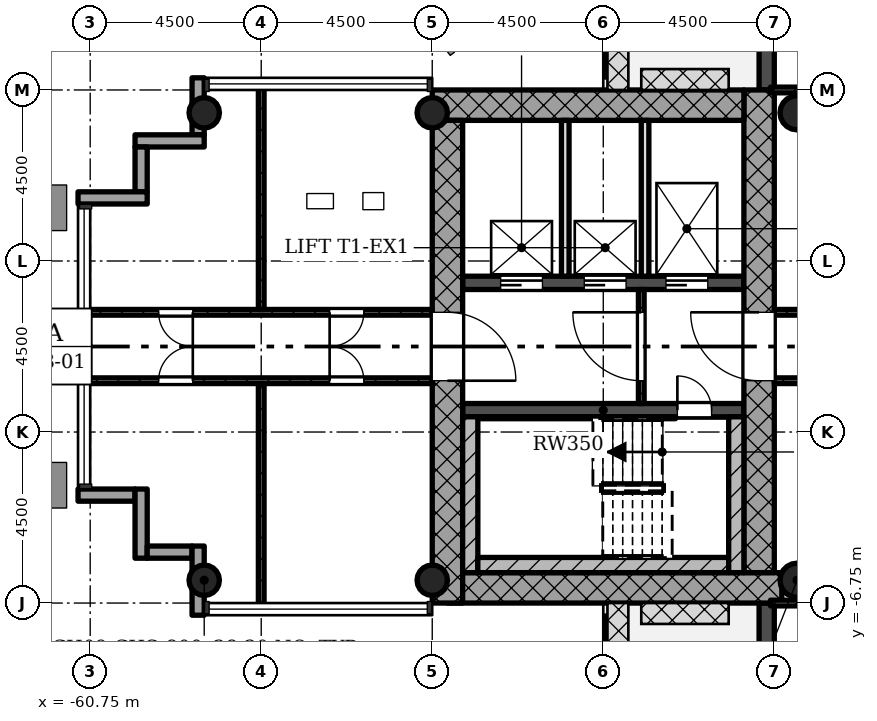
"""IFC4 building model, lengths in metres.
Left out: names, types, materials, properties, quantities, classifications, styles, units other than length and angle.
Written with IfcOpenShell. Run it as: python <this file> out.ifc"""

import sys

from ifc_helpers import new_model, si_unit, direction, frame, frame_2d, origin, origin_2d, place, context, subcontext, project, spatial, rectangle, hollow_circle, extrude, element, fill, save


model = new_model("IFC4")
c1 = context("Model", 3, precision=1e-05, world=origin(), true_north=direction((0.0, 1.0)))
c2 = subcontext(c1, "Body", "Model", "MODEL_VIEW")
j1 = project(units=[si_unit("LENGTHUNIT", "METRE"), si_unit("PLANEANGLEUNIT", "RADIAN")], contexts=[c1])
p1 = place(None, origin())
s1 = spatial("IfcSite", under=j1, at=p1, CompositionType="ELEMENT")
p2 = place(p1, origin())
s2 = spatial("IfcBuilding", under=s1, at=p2, CompositionType="ELEMENT")
p3 = place(p2, frame((0.0, 0.0, 128.7)))
s3 = spatial("IfcBuildingStorey", under=s2, at=p3, CompositionType="ELEMENT", Elevation=128.7)
p4 = place(p3, frame((-51.348, -6.35, 0.0), z_axis=(0.0, 0.0, 1.0), x_axis=(1.0, 0.0, 0.0)))
e1 = element("IfcWall", 1, at=p4, inside=s3, PredefinedType="SHEAR", context=c2, shape_type="SweptSolid", body=[
    extrude(rectangle(XDim=8.796, YDim=0.8, at=frame_2d((4.398, 0.0))), origin(), (0.0, 0.0, 1.0), 5.0),
])
p5 = place(p3, frame((-43.15, -5.95, 0.0), z_axis=(0.0, 0.0, 1.0), x_axis=(0.0, 1.0, 0.0)))
e2 = element("IfcWall", 2, at=p5, inside=s3, PredefinedType="SHEAR", context=c2, shape_type="SweptSolid", body=[
    extrude(rectangle(XDim=12.7, YDim=0.8, at=frame_2d((6.35, 0.0))), origin(), (0.0, 0.0, 1.0), 5.0),
])
p6 = place(p5, frame((5.05, 0.0, 0.0)))
e3 = element("IfcOpeningElement", 3, at=p6, cuts=e2, PredefinedType="OPENING", context=c2, shape_type="SweptSolid", body=[
    extrude(rectangle(XDim=1.8, YDim=2.1, at=frame_2d((0.9, 1.05))), frame((0.0, 0.41, 0.0), z_axis=(0.0, -1.0, 0.0), x_axis=(1.0, 0.0, 0.0)), (0.0, 0.0, 1.0), 0.82),
])
p7 = place(p3, frame((-43.55, 6.35, 0.0), z_axis=(0.0, 0.0, 1.0), x_axis=(-1.0, 0.0, 0.0)))
e4 = element("IfcWall", 4, at=p7, inside=s3, PredefinedType="SHEAR", context=c2, shape_type="SweptSolid", body=[
    extrude(rectangle(XDim=8.2, YDim=0.8, at=frame_2d((4.1, 0.0))), origin(), (0.0, 0.0, 1.0), 5.0),
])
p8 = place(p3, frame((-51.35, 5.95, 0.0), z_axis=(0.0, 0.0, 1.0), x_axis=(0.0, -1.0, 0.0)))
e5 = element("IfcWall", 5, at=p8, inside=s3, PredefinedType="SHEAR", context=c2, shape_type="SweptSolid", body=[
    extrude(rectangle(XDim=12.7, YDim=0.8, at=frame_2d((6.35, 0.0))), origin(), (0.0, 0.0, 1.0), 5.0),
])
p9 = place(p8, frame((5.05, 0.0, 0.0)))
e6 = element("IfcOpeningElement", 6, at=p9, cuts=e5, PredefinedType="OPENING", context=c2, shape_type="SweptSolid", body=[
    extrude(rectangle(XDim=1.8, YDim=2.1, at=frame_2d((0.9, 1.05))), frame((0.0, 0.41, 0.0), z_axis=(0.0, -1.0, 0.0), x_axis=(1.0, 0.0, 0.0)), (0.0, 0.0, 1.0), 0.82),
])
p10 = place(p3, frame((-50.95, -1.675, 0.0), z_axis=(0.0, 0.0, 1.0), x_axis=(1.0, 0.0, 0.0)))
e7 = element("IfcWall", 7, at=p10, inside=s3, PredefinedType="SHEAR", context=c2, shape_type="SweptSolid", body=[
    extrude(rectangle(XDim=7.4, YDim=0.35, at=frame_2d((3.7, 0.0))), origin(), (0.0, 0.0, 1.0), 5.0),
])
p11 = place(p10, frame((5.65, 0.0, 0.0)))
e8 = element("IfcOpeningElement", 8, at=p11, cuts=e7, PredefinedType="OPENING", context=c2, shape_type="SweptSolid", body=[
    extrude(rectangle(XDim=0.9, YDim=2.1, at=frame_2d((0.45, 1.05))), frame((0.0, 0.185, 0.0), z_axis=(0.0, -1.0, 0.0), x_axis=(1.0, 0.0, 0.0)), (0.0, 0.0, 1.0), 0.37),
])
p12 = place(p3, frame((-50.95, 1.675, 0.0), z_axis=(0.0, 0.0, 1.0), x_axis=(1.0, 0.0, 0.0)))
e9 = element("IfcWall", 9, at=p12, inside=s3, PredefinedType="SHEAR", context=c2, shape_type="SweptSolid", body=[
    extrude(rectangle(XDim=7.4, YDim=0.35, at=frame_2d((3.7, 0.0))), origin(), (0.0, 0.0, 1.0), 5.0),
])
p13 = place(p12, frame((5.35, 0.0, 0.0)))
e10 = element("IfcOpeningElement", 10, at=p13, cuts=e9, PredefinedType="OPENING", context=c2, shape_type="SweptSolid", body=[
    extrude(rectangle(XDim=1.1, YDim=2.1, at=frame_2d((0.55, 1.05))), frame((0.0, 0.185, 0.0), z_axis=(0.0, -1.0, 0.0), x_axis=(1.0, 0.0, 0.0)), (0.0, 0.0, 1.0), 0.37),
])
p14 = place(p12, frame((3.2, 0.0, 0.0)))
e11 = element("IfcOpeningElement", 11, at=p14, cuts=e9, PredefinedType="OPENING", context=c2, shape_type="SweptSolid", body=[
    extrude(rectangle(XDim=1.1, YDim=2.1, at=frame_2d((0.55, 1.05))), frame((0.0, 0.185, 0.0), z_axis=(0.0, -1.0, 0.0), x_axis=(1.0, 0.0, 0.0)), (0.0, 0.0, 1.0), 0.37),
])
p15 = place(p12, frame((1.0, 0.0, 0.0)))
e12 = element("IfcOpeningElement", 12, at=p15, cuts=e9, PredefinedType="OPENING", context=c2, shape_type="SweptSolid", body=[
    extrude(rectangle(XDim=1.1, YDim=2.1, at=frame_2d((0.55, 1.05))), frame((0.0, 0.185, 0.0), z_axis=(0.0, -1.0, 0.0), x_axis=(1.0, 0.0, 0.0)), (0.0, 0.0, 1.0), 0.37),
])
for number, where, z_axis, x_axis in (
    (13, (-51.75, -6.15, 0.0), (0.0, 0.0, 1.0), (1.0, 0.0, 0.0)),
    (14, (-51.75, 6.15, 0.0), (0.0, 0.0, 1.0), (1.0, 0.0, 0.0)),
    (15, (-57.75, -6.15, 0.0), (0.0, 0.0, 1.0), (1.0, 0.0, 0.0)),
    (16, (-57.75, 6.15, 0.0), (0.0, 0.0, 1.0), (1.0, 0.0, 0.0)),
):
    element("IfcColumn", number, at=place(p3, frame(where, z_axis=z_axis, x_axis=x_axis)), inside=s3, PredefinedType="COLUMN", context=c2, shape_type="SweptSolid", body=[
        extrude(hollow_circle(Radius=0.4, WallThickness=0.028, at=origin_2d()), origin(), (0.0, 0.0, 1.0), 5.0),
    ])
for number, where, z_axis, x_axis in (
    (17, (-42.15, -6.15, 0.0), (0.0, 0.0, 1.0), (1.0, 0.0, 0.0)),
    (18, (-42.15, 6.15, 0.0), (0.0, 0.0, 1.0), (1.0, 0.0, 0.0)),
):
    element("IfcColumn", number, at=place(p3, frame(where, z_axis=z_axis, x_axis=x_axis)), inside=s3, PredefinedType="COLUMN", context=c2, shape_type="SweptSolid", body=[
        extrude(hollow_circle(Radius=0.45, WallThickness=0.032, at=origin_2d()), origin(), (0.0, 0.0, 1.0), 5.0),
    ])
p16 = place(p3, frame((-61.07, -3.91, -0.3), z_axis=(0.0, 0.0, 1.0), x_axis=(1.0, 0.0, 0.0)))
e19 = element("IfcWall", 19, at=p16, inside=s3, PredefinedType="STANDARD", context=c2, shape_type="SweptSolid", body=[
    extrude(rectangle(XDim=1.5, YDim=0.32, at=frame_2d((0.75, 0.0))), origin(), (0.0, 0.0, 1.0), 5.0),
])
p17 = place(p3, frame((-59.41, -3.75, -0.3), z_axis=(0.0, 0.0, 1.0), x_axis=(0.0, -1.0, 0.0)))
e20 = element("IfcWall", 20, at=p17, inside=s3, PredefinedType="STANDARD", context=c2, shape_type="SweptSolid", body=[
    extrude(rectangle(XDim=1.82, YDim=0.32, at=frame_2d((0.91, 0.0))), origin(), (0.0, 0.0, 1.0), 5.0),
])
p18 = place(p3, frame((-59.25, -5.41, -0.3), z_axis=(0.0, 0.0, 1.0), x_axis=(1.0, 0.0, 0.0)))
e21 = element("IfcWall", 21, at=p18, inside=s3, PredefinedType="STANDARD", context=c2, shape_type="SweptSolid", body=[
    extrude(rectangle(XDim=1.18, YDim=0.32, at=frame_2d((0.59, 0.0))), origin(), (0.0, 0.0, 1.0), 5.0),
])
p19 = place(p3, frame((-57.91, -5.25, -0.3), z_axis=(0.0, 0.0, 1.0), x_axis=(0.0, -1.0, 0.0)))
e22 = element("IfcWall", 22, at=p19, inside=s3, PredefinedType="STANDARD", context=c2, shape_type="SweptSolid", body=[
    extrude(rectangle(XDim=1.82, YDim=0.32, at=frame_2d((0.91, 0.0))), origin(), (0.0, 0.0, 1.0), 5.0),
])
p20 = place(p3, frame((-42.95, -6.75, -0.02), z_axis=(0.0, 0.0, 1.0), x_axis=(0.0, -1.0, 0.0)))
e23 = element("IfcWall", 23, at=p20, inside=s3, PredefinedType="STANDARD", context=c2, shape_type="SweptSolid", body=[
    extrude(rectangle(XDim=4.5, YDim=0.4, at=frame_2d((2.25, 0.0))), origin(), (0.0, 0.0, 1.0), 4.72),
])
p21 = place(p20, frame((1.35, 0.0, 0.02)))
e24 = element("IfcOpeningElement", 24, at=p21, cuts=e23, PredefinedType="OPENING", context=c2, shape_type="SweptSolid", body=[
    extrude(rectangle(XDim=1.8, YDim=2.1, at=frame_2d((0.9, 1.05))), frame((0.0, 0.21, 0.0), z_axis=(0.0, -1.0, 0.0), x_axis=(1.0, 0.0, 0.0)), (0.0, 0.0, 1.0), 0.42),
])
p22 = place(p3, frame((-42.95, 11.25, -0.02), z_axis=(0.0, 0.0, 1.0), x_axis=(0.0, -1.0, 0.0)))
e25 = element("IfcWall", 25, at=p22, inside=s3, PredefinedType="STANDARD", context=c2, shape_type="SweptSolid", body=[
    extrude(rectangle(XDim=4.5, YDim=0.4, at=frame_2d((2.25, 0.0))), origin(), (0.0, 0.0, 1.0), 4.72),
])
p23 = place(p22, frame((1.35, 0.0, 0.02)))
e26 = element("IfcOpeningElement", 26, at=p23, cuts=e25, PredefinedType="OPENING", context=c2, shape_type="SweptSolid", body=[
    extrude(rectangle(XDim=1.8, YDim=2.1, at=frame_2d((0.9, 1.05))), frame((0.0, 0.21, 0.0), z_axis=(0.0, -1.0, 0.0), x_axis=(1.0, 0.0, 0.0)), (0.0, 0.0, 1.0), 0.42),
])
p24 = place(p3, frame((-57.91, 7.07, -0.3), z_axis=(0.0, 0.0, 1.0), x_axis=(0.0, -1.0, 0.0)))
e27 = element("IfcWall", 27, at=p24, inside=s3, PredefinedType="STANDARD", context=c2, shape_type="SweptSolid", body=[
    extrude(rectangle(XDim=1.5, YDim=0.32, at=frame_2d((0.75, 0.0))), origin(), (0.0, 0.0, 1.0), 5.0),
])
p25 = place(p3, frame((-57.75, 5.41, -0.3), z_axis=(0.0, 0.0, 1.0), x_axis=(-1.0, 0.0, 0.0)))
e28 = element("IfcWall", 28, at=p25, inside=s3, PredefinedType="STANDARD", context=c2, shape_type="SweptSolid", body=[
    extrude(rectangle(XDim=1.82, YDim=0.32, at=frame_2d((0.91, 0.0))), origin(), (0.0, 0.0, 1.0), 5.0),
])
p26 = place(p3, frame((-59.41, 5.25, -0.3), z_axis=(0.0, 0.0, 1.0), x_axis=(0.0, -1.0, 0.0)))
e29 = element("IfcWall", 29, at=p26, inside=s3, PredefinedType="STANDARD", context=c2, shape_type="SweptSolid", body=[
    extrude(rectangle(XDim=1.18, YDim=0.32, at=frame_2d((0.59, 0.0))), origin(), (0.0, 0.0, 1.0), 5.0),
])
p27 = place(p3, frame((-59.25, 3.91, -0.3), z_axis=(0.0, 0.0, 1.0), x_axis=(-1.0, 0.0, 0.0)))
e30 = element("IfcWall", 30, at=p27, inside=s3, PredefinedType="STANDARD", context=c2, shape_type="SweptSolid", body=[
    extrude(rectangle(XDim=1.82, YDim=0.32, at=frame_2d((0.91, 0.0))), origin(), (0.0, 0.0, 1.0), 5.0),
])
p28 = place(p3, frame((-46.25, 1.5, 0.0), z_axis=(0.0, 0.0, 1.0), x_axis=(0.0, -1.0, 0.0)))
e31 = element("IfcWall", 31, at=p28, inside=s3, PredefinedType="PARTITIONING", context=c2, shape_type="SweptSolid", body=[
    extrude(rectangle(XDim=3.0, YDim=0.15, at=frame_2d((1.5, 0.0))), origin(), (0.0, 0.0, 1.0), 4.58),
])
p29 = place(p28, frame((0.6, 0.0, 0.0)))
e32 = element("IfcOpeningElement", 32, at=p29, cuts=e31, PredefinedType="OPENING", context=c2, shape_type="SweptSolid", body=[
    extrude(rectangle(XDim=1.8, YDim=2.1, at=frame_2d((0.9, 1.05))), frame((0.0, 0.085, 0.0), z_axis=(0.0, -1.0, 0.0), x_axis=(1.0, 0.0, 0.0)), (0.0, 0.0, 1.0), 0.17),
])
for number, where, z_axis, x_axis in (
    (33, (-46.15, 5.95, 0.0), (0.0, 0.0, 1.0), (0.0, -1.0, 0.0)),
    (34, (-48.25, 5.95, 0.0), (0.0, 0.0, 1.0), (0.0, -1.0, 0.0)),
):
    element("IfcWall", number, at=place(p3, frame(where, z_axis=z_axis, x_axis=x_axis)), inside=s3, PredefinedType="SOLIDWALL", context=c2, shape_type="SweptSolid", body=[
        extrude(rectangle(XDim=4.1, YDim=0.2, at=frame_2d((2.05, 0.0))), origin(), (0.0, 0.0, 1.0), 4.58),
    ])
p30 = place(p3, frame((-42.75, 0.9, 0.0), z_axis=(0.0, 0.0, 1.0), x_axis=(1.0, 0.0, 0.0)))
e35 = element("IfcWall", 35, at=p30, inside=s3, PredefinedType="PARTITIONING", context=c2, shape_type="SweptSolid", body=[
    extrude(rectangle(XDim=5.85, YDim=0.15, at=frame_2d((2.925, 0.0))), origin(), (0.0, 0.0, 1.0), 4.58),
])
p31 = place(p30, frame((2.475, 0.0, 0.0)))
e36 = element("IfcOpeningElement", 36, at=p31, cuts=e35, PredefinedType="OPENING", context=c2, shape_type="SweptSolid", body=[
    extrude(rectangle(XDim=0.9, YDim=2.1, at=frame_2d((0.45, 1.05))), frame((0.0, 0.085, 0.0), z_axis=(0.0, -1.0, 0.0), x_axis=(1.0, 0.0, 0.0)), (0.0, 0.0, 1.0), 0.17),
])
p32 = place(p3, frame((-42.75, -0.9, 0.0), z_axis=(0.0, 0.0, 1.0), x_axis=(1.0, 0.0, 0.0)))
e37 = element("IfcWall", 37, at=p32, inside=s3, PredefinedType="PARTITIONING", context=c2, shape_type="SweptSolid", body=[
    extrude(rectangle(XDim=5.85, YDim=0.15, at=frame_2d((2.925, 0.0))), origin(), (0.0, 0.0, 1.0), 4.58),
])
p33 = place(p32, frame((2.475, 0.0, 0.0)))
e38 = element("IfcOpeningElement", 38, at=p33, cuts=e37, PredefinedType="OPENING", context=c2, shape_type="SweptSolid", body=[
    extrude(rectangle(XDim=0.9, YDim=2.1, at=frame_2d((0.45, 1.05))), frame((0.0, 0.085, 0.0), z_axis=(0.0, -1.0, 0.0), x_axis=(1.0, 0.0, 0.0)), (0.0, 0.0, 1.0), 0.17),
])
p34 = place(p3, frame((-60.85, 0.9, 0.0), z_axis=(0.0, 0.0, 1.0), x_axis=(1.0, 0.0, 0.0)))
e39 = element("IfcWall", 39, at=p34, inside=s3, PredefinedType="PARTITIONING", context=c2, shape_type="SweptSolid", body=[
    extrude(rectangle(XDim=9.1, YDim=0.15, at=frame_2d((4.55, 0.0))), origin(), (0.0, 0.0, 1.0), 4.58),
])
p35 = place(p34, frame((1.9, 0.0, 0.0)))
e40 = element("IfcOpeningElement", 40, at=p35, cuts=e39, PredefinedType="OPENING", context=c2, shape_type="SweptSolid", body=[
    extrude(rectangle(XDim=0.9, YDim=2.1, at=frame_2d((0.45, 1.05))), frame((0.0, 0.085, 0.0), z_axis=(0.0, -1.0, 0.0), x_axis=(1.0, 0.0, 0.0)), (0.0, 0.0, 1.0), 0.17),
])
p36 = place(p34, frame((6.4, 0.0, 0.0)))
e41 = element("IfcOpeningElement", 41, at=p36, cuts=e39, PredefinedType="OPENING", context=c2, shape_type="SweptSolid", body=[
    extrude(rectangle(XDim=0.9, YDim=2.1, at=frame_2d((0.45, 1.05))), frame((0.0, 0.085, 0.0), z_axis=(0.0, -1.0, 0.0), x_axis=(1.0, 0.0, 0.0)), (0.0, 0.0, 1.0), 0.17),
])
p37 = place(p3, frame((-56.25, 0.975, 0.0), z_axis=(0.0, 0.0, 1.0), x_axis=(0.0, 1.0, 0.0)))
e42 = element("IfcWall", 42, at=p37, inside=s3, PredefinedType="PARTITIONING", context=c2, shape_type="SweptSolid", body=[
    extrude(rectangle(XDim=5.875, YDim=0.15, at=frame_2d((2.938, 0.0))), origin(), (0.0, 0.0, 1.0), 4.58),
])
p38 = place(p3, frame((-60.85, -0.9, 0.0), z_axis=(0.0, 0.0, 1.0), x_axis=(1.0, 0.0, 0.0)))
e43 = element("IfcWall", 43, at=p38, inside=s3, PredefinedType="PARTITIONING", context=c2, shape_type="SweptSolid", body=[
    extrude(rectangle(XDim=9.1, YDim=0.15, at=frame_2d((4.55, 0.0))), origin(), (0.0, 0.0, 1.0), 4.58),
])
p39 = place(p38, frame((1.9, 0.0, 0.0)))
e44 = element("IfcOpeningElement", 44, at=p39, cuts=e43, PredefinedType="OPENING", context=c2, shape_type="SweptSolid", body=[
    extrude(rectangle(XDim=0.9, YDim=2.1, at=frame_2d((0.45, 1.05))), frame((0.0, 0.085, 0.0), z_axis=(0.0, -1.0, 0.0), x_axis=(1.0, 0.0, 0.0)), (0.0, 0.0, 1.0), 0.17),
])
p40 = place(p38, frame((6.4, 0.0, 0.0)))
e45 = element("IfcOpeningElement", 45, at=p40, cuts=e43, PredefinedType="OPENING", context=c2, shape_type="SweptSolid", body=[
    extrude(rectangle(XDim=0.9, YDim=2.1, at=frame_2d((0.45, 1.05))), frame((0.0, 0.085, 0.0), z_axis=(0.0, -1.0, 0.0), x_axis=(1.0, 0.0, 0.0)), (0.0, 0.0, 1.0), 0.17),
])
p41 = place(p3, frame((-56.25, -0.975, 0.0), z_axis=(0.0, 0.0, 1.0), x_axis=(0.0, -1.0, 0.0)))
e46 = element("IfcWall", 46, at=p41, inside=s3, PredefinedType="PARTITIONING", context=c2, shape_type="SweptSolid", body=[
    extrude(rectangle(XDim=5.875, YDim=0.15, at=frame_2d((2.938, 0.0))), origin(), (0.0, 0.0, 1.0), 4.58),
])
p42 = place(p3, frame((-42.85, 6.75, 0.0), z_axis=(0.0, 0.0, 1.0), x_axis=(1.0, 0.0, 0.0)))
e47 = element("IfcWall", 47, at=p42, inside=s3, PredefinedType="PARTITIONING", context=c2, shape_type="SweptSolid", body=[
    extrude(rectangle(XDim=13.7, YDim=0.15, at=frame_2d((6.85, 0.0))), origin(), (0.0, 0.0, 1.0), 4.58),
])
p43 = place(p42, frame((5.95, 0.0, 0.0)))
e48 = element("IfcOpeningElement", 48, at=p43, cuts=e47, PredefinedType="OPENING", context=c2, shape_type="SweptSolid", body=[
    extrude(rectangle(XDim=1.8, YDim=2.1, at=frame_2d((0.9, 1.05))), frame((0.0, 0.085, 0.0), z_axis=(0.0, -1.0, 0.0), x_axis=(1.0, 0.0, 0.0)), (0.0, 0.0, 1.0), 0.17),
])
p44 = place(p3, frame((-42.85, -6.75, 0.0), z_axis=(0.0, 0.0, 1.0), x_axis=(1.0, 0.0, 0.0)))
e49 = element("IfcWall", 49, at=p44, inside=s3, PredefinedType="PARTITIONING", context=c2, shape_type="SweptSolid", body=[
    extrude(rectangle(XDim=13.7, YDim=0.15, at=frame_2d((6.85, 0.0))), origin(), (0.0, 0.0, 1.0), 4.58),
])
p45 = place(p44, frame((5.95, 0.0, 0.0)))
e50 = element("IfcOpeningElement", 50, at=p45, cuts=e49, PredefinedType="OPENING", context=c2, shape_type="SweptSolid", body=[
    extrude(rectangle(XDim=1.8, YDim=2.1, at=frame_2d((0.9, 1.05))), frame((0.0, 0.085, 0.0), z_axis=(0.0, -1.0, 0.0), x_axis=(1.0, 0.0, 0.0)), (0.0, 0.0, 1.0), 0.17),
])
p46 = place(p3, frame((-50.75, -1.85, 0.0), z_axis=(0.0, 0.0, 1.0), x_axis=(0.0, -1.0, 0.0)))
e51 = element("IfcWall", 51, at=p46, inside=s3, PredefinedType="SHEAR", context=c2, shape_type="SweptSolid", body=[
    extrude(rectangle(XDim=4.1, YDim=0.4, at=frame_2d((2.05, 0.0))), origin(), (0.0, 0.0, 1.0), 5.0),
])
p47 = place(p3, frame((-43.95, -5.75, 0.0), z_axis=(0.0, 0.0, 1.0), x_axis=(-1.0, 0.0, 0.0)))
e52 = element("IfcWall", 52, at=p47, inside=s3, PredefinedType="SHEAR", context=c2, shape_type="SweptSolid", body=[
    extrude(rectangle(XDim=6.6, YDim=0.4, at=frame_2d((3.3, 0.0))), origin(), (0.0, 0.0, 1.0), 5.0),
])
p48 = place(p3, frame((-43.75, -1.85, 0.0), z_axis=(0.0, 0.0, 1.0), x_axis=(0.0, -1.0, 0.0)))
e53 = element("IfcWall", 53, at=p48, inside=s3, PredefinedType="SHEAR", context=c2, shape_type="SweptSolid", body=[
    extrude(rectangle(XDim=4.1, YDim=0.4, at=frame_2d((2.05, 0.0))), origin(), (0.0, 0.0, 1.0), 5.0),
])
p49 = place(p3, frame((-45.35, -1.875, 0.0), z_axis=(0.0, 0.0, 1.0), x_axis=(-1.0, 0.0, 0.0)))
e54 = element("IfcWall", 54, at=p49, inside=s3, PredefinedType="SHEAR", context=c2, shape_type="SweptSolid", body=[
    extrude(rectangle(XDim=5.2, YDim=0.05, at=frame_2d((2.6, 0.0))), origin(), (0.0, 0.0, 1.0), 5.0),
])
p50 = place(p29, origin())
e55 = element("IfcDoor", 55, at=p50, inside=s3, OperationType="SINGLE_SWING_LEFT", PredefinedType="DOOR", context=c2, shape_type="SweptSolid", body=[
    extrude(rectangle(XDim=1.8, YDim=2.1, at=frame_2d((0.9, 1.05))), frame((0.0, 0.025, 0.0), z_axis=(0.0, -1.0, 0.0), x_axis=(1.0, 0.0, 0.0)), (0.0, 0.0, 1.0), 0.05),
])
fill(e32, e55)
p51 = place(p35, origin())
e56 = element("IfcDoor", 56, at=p51, inside=s3, OperationType="SINGLE_SWING_RIGHT", PredefinedType="DOOR", context=c2, shape_type="SweptSolid", body=[
    extrude(rectangle(XDim=0.9, YDim=2.1, at=frame_2d((0.45, 1.05))), frame((0.0, 0.025, 0.0), z_axis=(0.0, -1.0, 0.0), x_axis=(1.0, 0.0, 0.0)), (0.0, 0.0, 1.0), 0.05),
])
fill(e40, e56)
p52 = place(p36, origin())
e57 = element("IfcDoor", 57, at=p52, inside=s3, OperationType="SINGLE_SWING_LEFT", PredefinedType="DOOR", context=c2, shape_type="SweptSolid", body=[
    extrude(rectangle(XDim=0.9, YDim=2.1, at=frame_2d((0.45, 1.05))), frame((0.0, 0.025, 0.0), z_axis=(0.0, -1.0, 0.0), x_axis=(1.0, 0.0, 0.0)), (0.0, 0.0, 1.0), 0.05),
])
fill(e41, e57)
p53 = place(p39, origin())
e58 = element("IfcDoor", 58, at=p53, inside=s3, OperationType="SINGLE_SWING_LEFT", PredefinedType="DOOR", context=c2, shape_type="SweptSolid", body=[
    extrude(rectangle(XDim=0.9, YDim=2.1, at=frame_2d((0.45, 1.05))), frame((0.0, 0.025, 0.0), z_axis=(0.0, -1.0, 0.0), x_axis=(1.0, 0.0, 0.0)), (0.0, 0.0, 1.0), 0.05),
])
fill(e44, e58)
p54 = place(p40, origin())
e59 = element("IfcDoor", 59, at=p54, inside=s3, OperationType="SINGLE_SWING_RIGHT", PredefinedType="DOOR", context=c2, shape_type="SweptSolid", body=[
    extrude(rectangle(XDim=0.9, YDim=2.1, at=frame_2d((0.45, 1.05))), frame((0.0, 0.025, 0.0), z_axis=(0.0, -1.0, 0.0), x_axis=(1.0, 0.0, 0.0)), (0.0, 0.0, 1.0), 0.05),
])
fill(e45, e59)
p55 = place(p11, origin())
e60 = element("IfcDoor", 60, at=p55, inside=s3, OperationType="SINGLE_SWING_RIGHT", PredefinedType="DOOR", context=c2, shape_type="SweptSolid", body=[
    extrude(rectangle(XDim=0.9, YDim=2.1, at=frame_2d((0.45, 1.05))), frame((0.0, 0.025, 0.0), z_axis=(0.0, -1.0, 0.0), x_axis=(1.0, 0.0, 0.0)), (0.0, 0.0, 1.0), 0.05),
])
fill(e8, e60)
p56 = place(p13, origin())
e61 = element("IfcDoor", 61, at=p56, inside=s3, OperationType="SLIDING_TO_LEFT", PredefinedType="DOOR", context=c2, shape_type="SweptSolid", body=[
    extrude(rectangle(XDim=1.1, YDim=2.1, at=frame_2d((0.55, 1.05))), frame((0.0, 0.025, 0.0), z_axis=(0.0, -1.0, 0.0), x_axis=(1.0, 0.0, 0.0)), (0.0, 0.0, 1.0), 0.05),
])
fill(e10, e61)
p57 = place(p14, origin())
e62 = element("IfcDoor", 62, at=p57, inside=s3, OperationType="SLIDING_TO_LEFT", PredefinedType="DOOR", context=c2, shape_type="SweptSolid", body=[
    extrude(rectangle(XDim=1.1, YDim=2.1, at=frame_2d((0.55, 1.05))), frame((0.0, 0.025, 0.0), z_axis=(0.0, -1.0, 0.0), x_axis=(1.0, 0.0, 0.0)), (0.0, 0.0, 1.0), 0.05),
])
fill(e11, e62)
p58 = place(p15, origin())
e63 = element("IfcDoor", 63, at=p58, inside=s3, OperationType="SLIDING_TO_LEFT", PredefinedType="DOOR", context=c2, shape_type="SweptSolid", body=[
    extrude(rectangle(XDim=1.1, YDim=2.1, at=frame_2d((0.55, 1.05))), frame((0.0, 0.025, 0.0), z_axis=(0.0, -1.0, 0.0), x_axis=(1.0, 0.0, 0.0)), (0.0, 0.0, 1.0), 0.05),
])
fill(e12, e63)
p59 = place(p6, origin())
e64 = element("IfcDoor", 64, at=p59, inside=s3, OperationType="SINGLE_SWING_LEFT", PredefinedType="DOOR", context=c2, shape_type="SweptSolid", body=[
    extrude(rectangle(XDim=1.8, YDim=2.1, at=frame_2d((0.9, 1.05))), frame((0.0, 0.025, 0.0), z_axis=(0.0, -1.0, 0.0), x_axis=(1.0, 0.0, 0.0)), (0.0, 0.0, 1.0), 0.05),
])
fill(e3, e64)
p60 = place(p9, origin())
e65 = element("IfcDoor", 65, at=p60, inside=s3, OperationType="SINGLE_SWING_LEFT", PredefinedType="DOOR", context=c2, shape_type="SweptSolid", body=[
    extrude(rectangle(XDim=1.8, YDim=2.1, at=frame_2d((0.9, 1.05))), frame((0.0, 0.025, 0.0), z_axis=(0.0, -1.0, 0.0), x_axis=(1.0, 0.0, 0.0)), (0.0, 0.0, 1.0), 0.05),
])
fill(e6, e65)
save(model, sys.argv[1])
